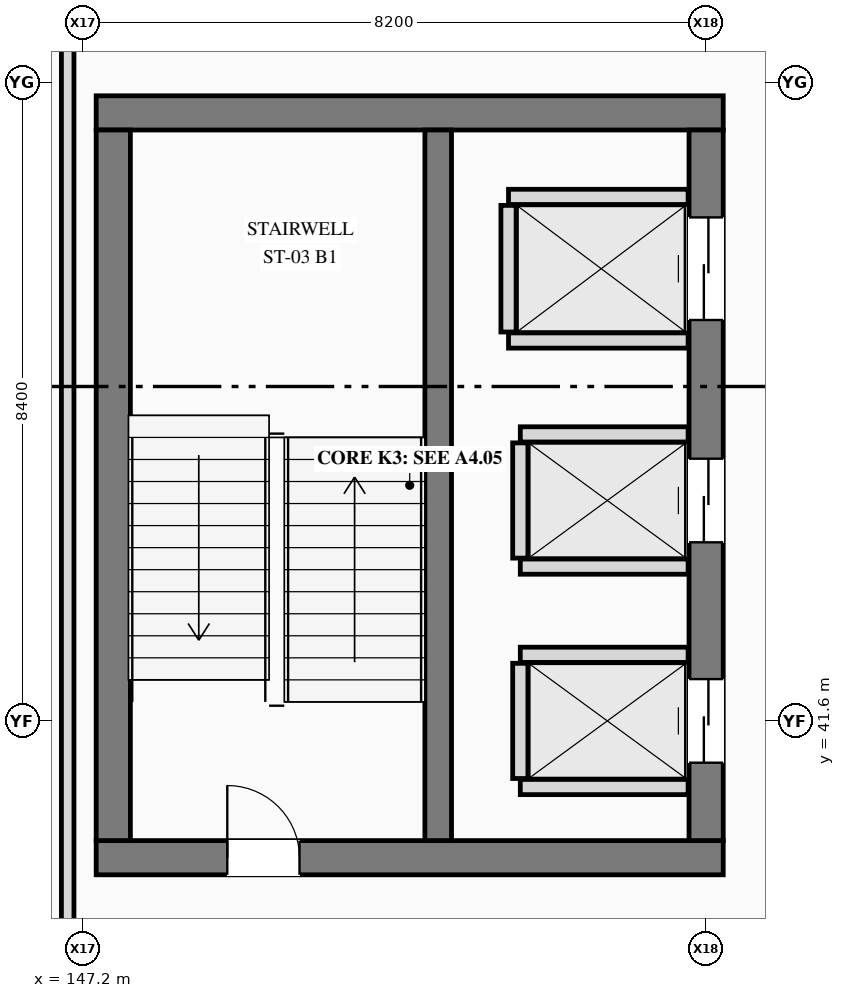
"""IFC4 building model, lengths in metres.
Left out: names, types, materials, properties, quantities, classifications, styles, units other than length and angle.
Written with IfcOpenShell. Run it as: python <this file> out.ifc"""

import sys

from ifc_helpers import new_model, si_unit, direction, frame, frame_2d, origin, place, context, subcontext, project, spatial, rectangle, extrude, element, fill, save


model = new_model("IFC4")
c1 = context("Model", 3, precision=1e-05, world=origin(), true_north=direction((0.0, 1.0)))
c2 = subcontext(c1, "Body", "Model", "MODEL_VIEW")
j1 = project(units=[si_unit("LENGTHUNIT", "METRE"), si_unit("PLANEANGLEUNIT", "RADIAN")], contexts=[c1])
p1 = place(None, origin())
s1 = spatial("IfcSite", under=j1, at=p1, CompositionType="ELEMENT")
p2 = place(p1, origin())
s2 = spatial("IfcBuilding", under=s1, at=p2, CompositionType="ELEMENT")
p3 = place(p2, frame((0.0, 0.0, -4.5)))
s3 = spatial("IfcBuildingStorey", under=s2, at=p3, CompositionType="ELEMENT", Elevation=-4.5)
p4 = place(p3, frame((147.375, 39.8, 0.0), z_axis=(0.0, 0.0, 1.0), x_axis=(1.0, 0.0, 0.0)))
e1 = element("IfcWall", 1, at=p4, inside=s3, PredefinedType="SHEAR", context=c2, shape_type="SweptSolid", body=[
    extrude(rectangle(XDim=8.25, YDim=0.45, at=frame_2d((4.125, 0.0))), origin(), (0.0, 0.0, 1.0), 4.5),
])
p5 = place(p4, frame((1.725, 0.0, 0.0)))
e2 = element("IfcOpeningElement", 2, at=p5, cuts=e1, PredefinedType="OPENING", context=c2, shape_type="SweptSolid", body=[
    extrude(rectangle(XDim=0.95, YDim=2.2, at=frame_2d((0.475, 1.1))), frame((0.0, 0.235, 0.0), z_axis=(0.0, -1.0, 0.0), x_axis=(1.0, 0.0, 0.0)), (0.0, 0.0, 1.0), 0.47),
])
p6 = place(p3, frame((155.625, 49.6, 0.0), z_axis=(0.0, 0.0, 1.0), x_axis=(-1.0, 0.0, 0.0)))
e3 = element("IfcWall", 3, at=p6, inside=s3, PredefinedType="SHEAR", context=c2, shape_type="SweptSolid", body=[
    extrude(rectangle(XDim=8.25, YDim=0.45, at=frame_2d((4.125, 0.0))), origin(), (0.0, 0.0, 1.0), 4.5),
])
p7 = place(p3, frame((147.6, 49.375, 0.0), z_axis=(0.0, 0.0, 1.0), x_axis=(0.0, -1.0, 0.0)))
e4 = element("IfcWall", 4, at=p7, inside=s3, PredefinedType="SHEAR", context=c2, shape_type="SweptSolid", body=[
    extrude(rectangle(XDim=9.35, YDim=0.45, at=frame_2d((4.675, 0.0))), origin(), (0.0, 0.0, 1.0), 4.5),
])
p8 = place(p3, frame((155.4, 40.025, 0.0), z_axis=(0.0, 0.0, 1.0), x_axis=(0.0, 1.0, 0.0)))
e5 = element("IfcWall", 5, at=p8, inside=s3, PredefinedType="SHEAR", context=c2, shape_type="SweptSolid", body=[
    extrude(rectangle(XDim=9.35, YDim=0.45, at=frame_2d((4.675, 0.0))), origin(), (0.0, 0.0, 1.0), 4.5),
])
p9 = place(p8, frame((1.025, 0.0, 0.0)))
e6 = element("IfcOpeningElement", 6, at=p9, cuts=e5, PredefinedType="OPENING", context=c2, shape_type="SweptSolid", body=[
    extrude(rectangle(XDim=1.1, YDim=2.2, at=frame_2d((0.55, 1.1))), frame((0.0, 0.235, 0.0), z_axis=(0.0, -1.0, 0.0), x_axis=(1.0, 0.0, 0.0)), (0.0, 0.0, 1.0), 0.47),
])
p10 = place(p8, frame((3.925, 0.0, 0.0)))
e7 = element("IfcOpeningElement", 7, at=p10, cuts=e5, PredefinedType="OPENING", context=c2, shape_type="SweptSolid", body=[
    extrude(rectangle(XDim=1.1, YDim=2.2, at=frame_2d((0.55, 1.1))), frame((0.0, 0.235, 0.0), z_axis=(0.0, -1.0, 0.0), x_axis=(1.0, 0.0, 0.0)), (0.0, 0.0, 1.0), 0.47),
])
p11 = place(p8, frame((6.85, 0.0, 0.0)))
e8 = element("IfcOpeningElement", 8, at=p11, cuts=e5, PredefinedType="OPENING", context=c2, shape_type="SweptSolid", body=[
    extrude(rectangle(XDim=1.35, YDim=2.3, at=frame_2d((0.675, 1.15))), frame((0.0, 0.235, 0.0), z_axis=(0.0, -1.0, 0.0), x_axis=(1.0, 0.0, 0.0)), (0.0, 0.0, 1.0), 0.47),
])
p12 = place(p3, frame((151.875, 40.025, 0.0), z_axis=(0.0, 0.0, 1.0), x_axis=(0.0, 1.0, 0.0)))
e9 = element("IfcWall", 9, at=p12, inside=s3, PredefinedType="SHEAR", context=c2, shape_type="SweptSolid", body=[
    extrude(rectangle(XDim=9.35, YDim=0.35, at=frame_2d((4.675, 0.0))), origin(), (0.0, 0.0, 1.0), 4.5),
])
for number, where, z_axis, x_axis in (
    (10, (152.955, 40.73, 0.0), (0.0, 0.0, 1.0), (1.0, 0.0, 0.0)),
    (11, (152.955, 42.47, 0.0), (0.0, 0.0, 1.0), (1.0, 0.0, 0.0)),
):
    element("IfcWall", number, at=place(p3, frame(where, z_axis=z_axis, x_axis=x_axis)), inside=s3, PredefinedType="PLUMBINGWALL", context=c2, shape_type="SweptSolid", body=[
        extrude(rectangle(XDim=2.208, YDim=0.2, at=frame_2d((1.104, 0.0))), origin(), (0.0, 0.0, 1.0), 4.175),
    ])
p13 = place(p3, frame((152.955, 40.842, 0.0), z_axis=(0.0, 0.0, 1.0), x_axis=(0.0, 1.0, 0.0)))
e12 = element("IfcWall", 12, at=p13, inside=s3, PredefinedType="PLUMBINGWALL", context=c2, shape_type="SweptSolid", body=[
    extrude(rectangle(XDim=1.516, YDim=0.2, at=frame_2d((0.758, 0.0))), origin(), (0.0, 0.0, 1.0), 4.175),
])
for number, where, z_axis, x_axis in (
    (13, (152.955, 43.63, 0.0), (0.0, 0.0, 1.0), (1.0, 0.0, 0.0)),
    (14, (152.955, 45.37, 0.0), (0.0, 0.0, 1.0), (1.0, 0.0, 0.0)),
):
    element("IfcWall", number, at=place(p3, frame(where, z_axis=z_axis, x_axis=x_axis)), inside=s3, PredefinedType="PLUMBINGWALL", context=c2, shape_type="SweptSolid", body=[
        extrude(rectangle(XDim=2.208, YDim=0.2, at=frame_2d((1.104, 0.0))), origin(), (0.0, 0.0, 1.0), 4.175),
    ])
p14 = place(p3, frame((152.955, 43.742, 0.0), z_axis=(0.0, 0.0, 1.0), x_axis=(0.0, 1.0, 0.0)))
e15 = element("IfcWall", 15, at=p14, inside=s3, PredefinedType="PLUMBINGWALL", context=c2, shape_type="SweptSolid", body=[
    extrude(rectangle(XDim=1.516, YDim=0.2, at=frame_2d((0.758, 0.0))), origin(), (0.0, 0.0, 1.0), 4.175),
])
for number, where, z_axis, x_axis in (
    (16, (152.8, 46.605, 0.0), (0.0, 0.0, 1.0), (1.0, 0.0, 0.0)),
    (17, (152.8, 48.495, 0.0), (0.0, 0.0, 1.0), (1.0, 0.0, 0.0)),
):
    element("IfcWall", number, at=place(p3, frame(where, z_axis=z_axis, x_axis=x_axis)), inside=s3, PredefinedType="PLUMBINGWALL", context=c2, shape_type="SweptSolid", body=[
        extrude(rectangle(XDim=2.363, YDim=0.2, at=frame_2d((1.182, 0.0))), origin(), (0.0, 0.0, 1.0), 4.175),
    ])
p15 = place(p3, frame((152.8, 46.717, 0.0), z_axis=(0.0, 0.0, 1.0), x_axis=(0.0, 1.0, 0.0)))
e18 = element("IfcWall", 18, at=p15, inside=s3, PredefinedType="PLUMBINGWALL", context=c2, shape_type="SweptSolid", body=[
    extrude(rectangle(XDim=1.666, YDim=0.2, at=frame_2d((0.833, 0.0))), origin(), (0.0, 0.0, 1.0), 4.175),
])
p16 = place(p3, frame((147.0, 19.294, 0.0), z_axis=(0.0, 0.0, 1.0), x_axis=(0.0, 1.0, 0.0)))
e19 = element("IfcWall", 19, at=p16, inside=s3, PredefinedType="PARTITIONING", context=c2, shape_type="SweptSolid", body=[
    extrude(rectangle(XDim=48.141, YDim=0.165, at=frame_2d((24.07, 0.0))), origin(), (0.0, 0.0, 1.0), 3.413),
])
p17 = place(p5, origin())
e20 = element("IfcDoor", 20, at=p17, inside=s3, OperationType="SINGLE_SWING_LEFT", PredefinedType="DOOR", context=c2, shape_type="SweptSolid", body=[
    extrude(rectangle(XDim=0.95, YDim=2.2, at=frame_2d((0.475, 1.1))), frame((0.0, 0.025, 0.0), z_axis=(0.0, -1.0, 0.0), x_axis=(1.0, 0.0, 0.0)), (0.0, 0.0, 1.0), 0.05),
])
fill(e2, e20)
p18 = place(p9, origin())
e21 = element("IfcDoor", 21, at=p18, inside=s3, OperationType="SLIDING_TO_LEFT", PredefinedType="DOOR", context=c2, shape_type="SweptSolid", body=[
    extrude(rectangle(XDim=1.1, YDim=2.2, at=frame_2d((0.55, 1.1))), frame((0.0, 0.025, 0.0), z_axis=(0.0, -1.0, 0.0), x_axis=(1.0, 0.0, 0.0)), (0.0, 0.0, 1.0), 0.05),
])
fill(e6, e21)
p19 = place(p10, origin())
e22 = element("IfcDoor", 22, at=p19, inside=s3, OperationType="SLIDING_TO_RIGHT", PredefinedType="DOOR", context=c2, shape_type="SweptSolid", body=[
    extrude(rectangle(XDim=1.1, YDim=2.2, at=frame_2d((0.55, 1.1))), frame((0.0, 0.025, 0.0), z_axis=(0.0, -1.0, 0.0), x_axis=(1.0, 0.0, 0.0)), (0.0, 0.0, 1.0), 0.05),
])
fill(e7, e22)
p20 = place(p11, origin())
e23 = element("IfcDoor", 23, at=p20, inside=s3, OperationType="SLIDING_TO_LEFT", PredefinedType="DOOR", context=c2, shape_type="SweptSolid", body=[
    extrude(rectangle(XDim=1.35, YDim=2.3, at=frame_2d((0.675, 1.15))), frame((0.0, 0.025, 0.0), z_axis=(0.0, -1.0, 0.0), x_axis=(1.0, 0.0, 0.0)), (0.0, 0.0, 1.0), 0.05),
])
fill(e8, e23)
save(model, sys.argv[1])
